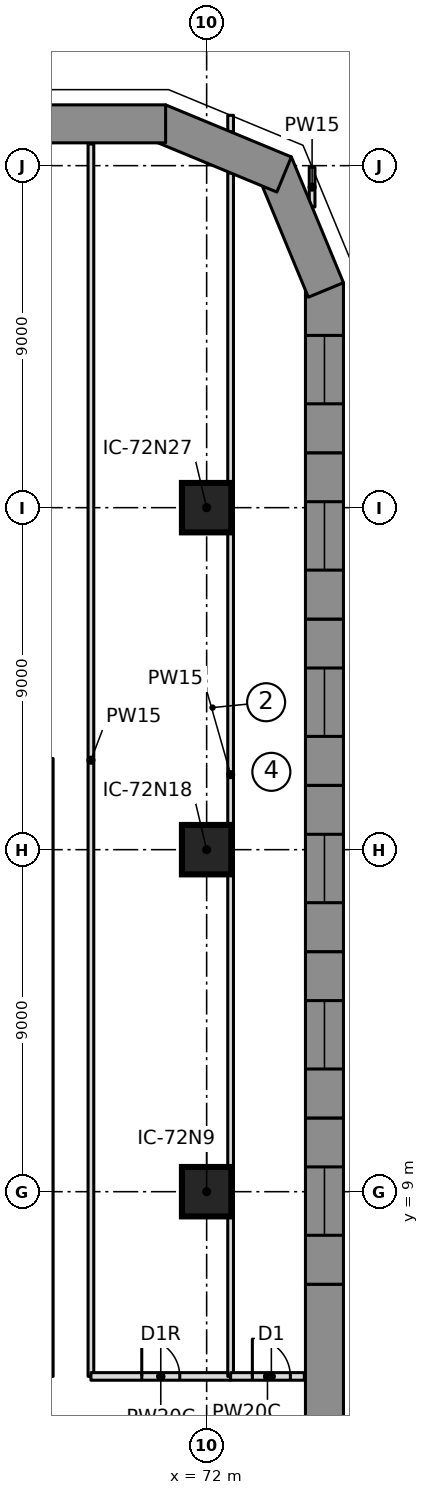
"""IFC4 building model, lengths in metres.
Left out: names, types, materials, properties, quantities, classifications, styles, units other than length and angle.
Written with IfcOpenShell. Run it as: python <this file> out.ifc"""

import sys

from ifc_helpers import new_model, si_unit, direction, frame, frame_2d, origin, origin_2d, place, context, subcontext, project, spatial, polyline, rectangle, outline, extrude, element, fill, save


model = new_model("IFC4")
c1 = context("Model", 3, precision=1e-05, world=origin(), true_north=direction((0.0, 1.0)))
c2 = subcontext(c1, "Body", "Model", "MODEL_VIEW")
j1 = project(units=[si_unit("LENGTHUNIT", "METRE"), si_unit("PLANEANGLEUNIT", "RADIAN")], contexts=[c1])
p1 = place(None, origin())
s1 = spatial("IfcSite", under=j1, at=p1, CompositionType="ELEMENT")
p2 = place(p1, origin())
s2 = spatial("IfcBuilding", under=s1, at=p2, CompositionType="ELEMENT")
p3 = place(p2, frame((0.0, 0.0, 19.0)))
s3 = spatial("IfcBuildingStorey", under=s2, at=p3, CompositionType="ELEMENT", Elevation=19.0)
for number, where, z_axis, x_axis in (
    (1, (72.0, 9.0, 0.0), (0.0, 0.0, 1.0), (1.0, 0.0, 0.0)),
    (2, (72.0, 18.0, 0.0), (0.0, 0.0, 1.0), (1.0, 0.0, 0.0)),
    (3, (72.0, 27.0, 0.0), (0.0, 0.0, 1.0), (1.0, 0.0, 0.0)),
):
    element("IfcColumn", number, at=place(p3, frame(where, z_axis=z_axis, x_axis=x_axis)), inside=s3, PredefinedType="COLUMN", context=c2, shape_type="SweptSolid", body=[
        extrude(rectangle(XDim=1.3, YDim=1.3, at=origin_2d()), origin(), (0.0, 0.0, 1.0), 5.0),
    ])
p4 = place(p3, frame((75.1, 2.188, 0.0), z_axis=(0.0, 0.0, 1.0), x_axis=(0.0, 1.0, 0.0)))
e4 = element("IfcWall", 4, at=p4, inside=s3, PredefinedType="NOTDEFINED", context=c2, shape_type="SweptSolid", body=[
    extrude(outline(polyline([(0.0, -0.5), (4.376, -0.5), (4.376, 0.5), (0.0, 0.5), (0.0, -0.5)])), origin(), (0.0, 0.0, 1.0), 4.7),
])
p5 = place(p3, frame((75.1, 6.564, 0.0), z_axis=(0.0, 0.0, 1.0), x_axis=(0.0, 1.0, 0.0)))
e5 = element("IfcWall", 5, at=p5, inside=s3, PredefinedType="NOTDEFINED", context=c2, shape_type="SweptSolid", body=[
    extrude(outline(polyline([(0.0, -0.5), (4.376, -0.5), (4.376, 0.5), (0.0, 0.5), (0.0, -0.5)])), origin(), (0.0, 0.0, 1.0), 4.7),
])
p6 = place(p5, frame((1.288, 0.0, 0.9)))
e6 = element("IfcOpeningElement", 6, at=p6, cuts=e5, PredefinedType="OPENING", context=c2, shape_type="SweptSolid", body=[
    extrude(rectangle(XDim=1.8, YDim=2.4, at=frame_2d((0.9, 1.2))), frame((0.0, 0.51, 0.0), z_axis=(0.0, -1.0, 0.0), x_axis=(1.0, 0.0, 0.0)), (0.0, 0.0, 1.0), 1.02),
])
p7 = place(p3, frame((75.1, 10.94, 0.0), z_axis=(0.0, 0.0, 1.0), x_axis=(0.0, 1.0, 0.0)))
e7 = element("IfcWall", 7, at=p7, inside=s3, PredefinedType="NOTDEFINED", context=c2, shape_type="SweptSolid", body=[
    extrude(outline(polyline([(0.0, -0.5), (4.376, -0.5), (4.376, 0.5), (0.0, 0.5), (0.0, -0.5)])), origin(), (0.0, 0.0, 1.0), 4.7),
])
p8 = place(p7, frame((1.288, 0.0, 0.9)))
e8 = element("IfcOpeningElement", 8, at=p8, cuts=e7, PredefinedType="OPENING", context=c2, shape_type="SweptSolid", body=[
    extrude(rectangle(XDim=1.8, YDim=2.4, at=frame_2d((0.9, 1.2))), frame((0.0, 0.51, 0.0), z_axis=(0.0, -1.0, 0.0), x_axis=(1.0, 0.0, 0.0)), (0.0, 0.0, 1.0), 1.02),
])
p9 = place(p3, frame((75.1, 15.316, 0.0), z_axis=(0.0, 0.0, 1.0), x_axis=(0.0, 1.0, 0.0)))
e9 = element("IfcWall", 9, at=p9, inside=s3, PredefinedType="NOTDEFINED", context=c2, shape_type="SweptSolid", body=[
    extrude(outline(polyline([(0.0, -0.5), (4.376, -0.5), (4.376, 0.5), (0.0, 0.5), (0.0, -0.5)])), origin(), (0.0, 0.0, 1.0), 4.7),
])
p10 = place(p9, frame((1.288, 0.0, 0.9)))
e10 = element("IfcOpeningElement", 10, at=p10, cuts=e9, PredefinedType="OPENING", context=c2, shape_type="SweptSolid", body=[
    extrude(rectangle(XDim=1.8, YDim=2.4, at=frame_2d((0.9, 1.2))), frame((0.0, 0.51, 0.0), z_axis=(0.0, -1.0, 0.0), x_axis=(1.0, 0.0, 0.0)), (0.0, 0.0, 1.0), 1.02),
])
p11 = place(p3, frame((75.1, 19.693, 0.0), z_axis=(0.0, 0.0, 1.0), x_axis=(0.0, 1.0, 0.0)))
e11 = element("IfcWall", 11, at=p11, inside=s3, PredefinedType="NOTDEFINED", context=c2, shape_type="SweptSolid", body=[
    extrude(outline(polyline([(0.0, -0.5), (4.376, -0.5), (4.376, 0.5), (0.0, 0.5), (0.0, -0.5)])), origin(), (0.0, 0.0, 1.0), 4.7),
])
p12 = place(p11, frame((1.288, 0.0, 0.9)))
e12 = element("IfcOpeningElement", 12, at=p12, cuts=e11, PredefinedType="OPENING", context=c2, shape_type="SweptSolid", body=[
    extrude(rectangle(XDim=1.8, YDim=2.4, at=frame_2d((0.9, 1.2))), frame((0.0, 0.51, 0.0), z_axis=(0.0, -1.0, 0.0), x_axis=(1.0, 0.0, 0.0)), (0.0, 0.0, 1.0), 1.02),
])
p13 = place(p3, frame((75.1, 24.069, 0.0), z_axis=(0.0, 0.0, 1.0), x_axis=(0.0, 1.0, 0.0)))
e13 = element("IfcWall", 13, at=p13, inside=s3, PredefinedType="NOTDEFINED", context=c2, shape_type="SweptSolid", body=[
    extrude(outline(polyline([(0.0, -0.5), (4.376, -0.5), (4.376, 0.5), (0.0, 0.5), (0.0, -0.5)])), origin(), (0.0, 0.0, 1.0), 4.7),
])
p14 = place(p13, frame((1.288, 0.0, 0.9)))
e14 = element("IfcOpeningElement", 14, at=p14, cuts=e13, PredefinedType="OPENING", context=c2, shape_type="SweptSolid", body=[
    extrude(rectangle(XDim=1.8, YDim=2.4, at=frame_2d((0.9, 1.2))), frame((0.0, 0.51, 0.0), z_axis=(0.0, -1.0, 0.0), x_axis=(1.0, 0.0, 0.0)), (0.0, 0.0, 1.0), 1.02),
])
p15 = place(p3, frame((75.1, 28.445, 0.0), z_axis=(0.0, 0.0, 1.0), x_axis=(0.0, 1.0, 0.0)))
e15 = element("IfcWall", 15, at=p15, inside=s3, PredefinedType="NOTDEFINED", context=c2, shape_type="SweptSolid", body=[
    extrude(outline(polyline([(0.0, -0.5), (4.476, -0.5), (4.277, 0.5), (0.0, 0.5), (0.0, -0.5)])), origin(), (0.0, 0.0, 1.0), 4.7),
])
p16 = place(p15, frame((1.288, 0.0, 0.9)))
e16 = element("IfcOpeningElement", 16, at=p16, cuts=e15, PredefinedType="OPENING", context=c2, shape_type="SweptSolid", body=[
    extrude(rectangle(XDim=1.8, YDim=2.4, at=frame_2d((0.9, 1.2))), frame((0.0, 0.51, 0.0), z_axis=(0.0, -1.0, 0.0), x_axis=(1.0, 0.0, 0.0)), (0.0, 0.0, 1.0), 1.02),
])
p17 = place(p3, frame((75.1, 32.821, 0.0), z_axis=(0.0, 0.0, 1.0), x_axis=(-0.382724875529, 0.923862365102, 0.0)))
e17 = element("IfcWall", 17, at=p17, inside=s3, PredefinedType="NOTDEFINED", context=c2, shape_type="SweptSolid", body=[
    extrude(outline(polyline([(-0.1, -0.5), (3.482, -0.5), (3.068, 0.5), (0.1, 0.5), (-0.1, -0.5)])), origin(), (0.0, 0.0, 1.0), 4.7),
])
p18 = place(p3, frame((73.847, 35.847, 0.0), z_axis=(0.0, 0.0, 1.0), x_axis=(-0.923862365102, 0.382724875529, 0.0)))
e18 = element("IfcWall", 18, at=p18, inside=s3, PredefinedType="NOTDEFINED", context=c2, shape_type="SweptSolid", body=[
    extrude(outline(polyline([(-0.207, -0.5), (3.375, -0.5), (3.175, 0.5), (0.207, 0.5), (-0.207, -0.5)])), origin(), (0.0, 0.0, 1.0), 4.7),
])
p19 = place(p3, frame((70.821, 37.1, 0.0), z_axis=(0.0, 0.0, 1.0), x_axis=(-1.0, 0.0, 0.0)))
e19 = element("IfcWall", 19, at=p19, inside=s3, PredefinedType="NOTDEFINED", context=c2, shape_type="SweptSolid", body=[
    extrude(outline(polyline([(-0.1, -0.5), (3.94, -0.5), (3.94, 0.5), (0.1, 0.5), (-0.1, -0.5)])), origin(), (0.0, 0.0, 1.0), 4.7),
])
p20 = place(p3, frame((68.955, 4.139, 0.0), z_axis=(0.0, 0.0, 1.0), x_axis=(0.0, 1.0, 0.0)))
e20 = element("IfcWall", 20, at=p20, inside=s3, PredefinedType="PARTITIONING", context=c2, shape_type="SweptSolid", body=[
    extrude(rectangle(XDim=32.431, YDim=0.15, at=frame_2d((16.216, 0.0))), origin(), (0.0, 0.0, 1.0), 4.65),
])
p21 = place(p3, frame((68.955, 4.139, 0.0), z_axis=(0.0, 0.0, 1.0), x_axis=(1.0, 0.0, 0.0)))
e21 = element("IfcWall", 21, at=p21, inside=s3, PredefinedType="PARTITIONING", context=c2, shape_type="SweptSolid", body=[
    extrude(rectangle(XDim=3.676, YDim=0.2, at=frame_2d((1.838, 0.0))), origin(), (0.0, 0.0, 1.0), 4.65),
])
p22 = place(p21, frame((1.338, 0.0, 0.0)))
e22 = element("IfcOpeningElement", 22, at=p22, cuts=e21, PredefinedType="OPENING", context=c2, shape_type="SweptSolid", body=[
    extrude(rectangle(XDim=1.0, YDim=2.1, at=frame_2d((0.5, 1.05))), frame((0.0, 0.11, 0.0), z_axis=(0.0, -1.0, 0.0), x_axis=(1.0, 0.0, 0.0)), (0.0, 0.0, 1.0), 0.22),
])
p23 = place(p3, frame((72.631, 4.139, 0.0), z_axis=(0.0, 0.0, 1.0), x_axis=(0.0, 1.0, 0.0)))
e23 = element("IfcWall", 23, at=p23, inside=s3, PredefinedType="PARTITIONING", context=c2, shape_type="SweptSolid", body=[
    extrude(rectangle(XDim=31.67, YDim=0.15, at=frame_2d((15.835, 0.0))), origin(), (0.0, 0.0, 1.0), 4.65),
])
p24 = place(p3, frame((72.631, 36.892, 0.0), z_axis=(0.0, 0.0, 1.0), x_axis=(0.0, 1.0, 0.0)))
e24 = element("IfcWall", 24, at=p24, inside=s3, PredefinedType="PARTITIONING", context=c2, shape_type="SweptSolid", body=[
    extrude(rectangle(XDim=0.433, YDim=0.15, at=frame_2d((0.217, 0.0))), origin(), (0.0, 0.0, 1.0), 4.65),
])
p25 = place(p3, frame((72.631, 4.139, 0.0), z_axis=(0.0, 0.0, 1.0), x_axis=(1.0, 0.0, 0.0)))
e25 = element("IfcWall", 25, at=p25, inside=s3, PredefinedType="PARTITIONING", context=c2, shape_type="SweptSolid", body=[
    extrude(rectangle(XDim=1.939, YDim=0.2, at=frame_2d((0.97, 0.0))), origin(), (0.0, 0.0, 1.0), 4.65),
])
p26 = place(p25, frame((0.572, 0.0, 0.0)))
e26 = element("IfcOpeningElement", 26, at=p26, cuts=e25, PredefinedType="OPENING", context=c2, shape_type="SweptSolid", body=[
    extrude(rectangle(XDim=1.0, YDim=2.1, at=frame_2d((0.5, 1.05))), frame((0.0, 0.11, 0.0), z_axis=(0.0, -1.0, 0.0), x_axis=(1.0, 0.0, 0.0)), (0.0, 0.0, 1.0), 0.22),
])
p27 = place(p3, frame((74.775, 34.913, 0.0), z_axis=(0.0, 0.0, 1.0), x_axis=(0.0, 1.0, 0.0)))
e27 = element("IfcWall", 27, at=p27, inside=s3, PredefinedType="PARTITIONING", context=c2, shape_type="SweptSolid", body=[
    extrude(rectangle(XDim=1.045, YDim=0.15, at=frame_2d((0.523, 0.0))), origin(), (0.0, 0.0, 1.0), 4.65),
])
p28 = place(p3, frame((67.86, 4.139, 0.0), z_axis=(0.0, 0.0, 1.0), x_axis=(0.0, 1.0, 0.0)))
e28 = element("IfcWall", 28, at=p28, inside=s3, PredefinedType="PARTITIONING", context=c2, shape_type="SweptSolid", body=[
    extrude(rectangle(XDim=16.261, YDim=0.2, at=frame_2d((8.131, 0.0))), origin(), (0.0, 0.0, 1.0), 4.65),
])
p29 = place(p28, frame((7.631, 0.0, 0.0)))
e29 = element("IfcOpeningElement", 29, at=p29, cuts=e28, PredefinedType="OPENING", context=c2, shape_type="SweptSolid", body=[
    extrude(rectangle(XDim=1.0, YDim=2.1, at=frame_2d((0.5, 1.05))), frame((0.0, 0.11, 0.0), z_axis=(0.0, -1.0, 0.0), x_axis=(1.0, 0.0, 0.0)), (0.0, 0.0, 1.0), 0.22),
])
p30 = place(p6, origin())
e30 = element("IfcWindow", 30, at=p30, inside=s3, PartitioningType="SINGLE_PANEL", PredefinedType="WINDOW", context=c2, shape_type="SweptSolid", body=[
    extrude(rectangle(XDim=1.8, YDim=2.4, at=frame_2d((0.9, 1.2))), frame((0.0, 0.5, 0.0), z_axis=(0.0, -1.0, 0.0), x_axis=(1.0, 0.0, 0.0)), (0.0, 0.0, 1.0), 0.06),
])
fill(e6, e30)
p31 = place(p8, origin())
e31 = element("IfcWindow", 31, at=p31, inside=s3, PartitioningType="SINGLE_PANEL", PredefinedType="WINDOW", context=c2, shape_type="SweptSolid", body=[
    extrude(rectangle(XDim=1.8, YDim=2.4, at=frame_2d((0.9, 1.2))), frame((0.0, 0.5, 0.0), z_axis=(0.0, -1.0, 0.0), x_axis=(1.0, 0.0, 0.0)), (0.0, 0.0, 1.0), 0.06),
])
fill(e8, e31)
p32 = place(p10, origin())
e32 = element("IfcWindow", 32, at=p32, inside=s3, PartitioningType="SINGLE_PANEL", PredefinedType="WINDOW", context=c2, shape_type="SweptSolid", body=[
    extrude(rectangle(XDim=1.8, YDim=2.4, at=frame_2d((0.9, 1.2))), frame((0.0, 0.5, 0.0), z_axis=(0.0, -1.0, 0.0), x_axis=(1.0, 0.0, 0.0)), (0.0, 0.0, 1.0), 0.06),
])
fill(e10, e32)
p33 = place(p12, origin())
e33 = element("IfcWindow", 33, at=p33, inside=s3, PartitioningType="SINGLE_PANEL", PredefinedType="WINDOW", context=c2, shape_type="SweptSolid", body=[
    extrude(rectangle(XDim=1.8, YDim=2.4, at=frame_2d((0.9, 1.2))), frame((0.0, 0.5, 0.0), z_axis=(0.0, -1.0, 0.0), x_axis=(1.0, 0.0, 0.0)), (0.0, 0.0, 1.0), 0.06),
])
fill(e12, e33)
p34 = place(p14, origin())
e34 = element("IfcWindow", 34, at=p34, inside=s3, PartitioningType="SINGLE_PANEL", PredefinedType="WINDOW", context=c2, shape_type="SweptSolid", body=[
    extrude(rectangle(XDim=1.8, YDim=2.4, at=frame_2d((0.9, 1.2))), frame((0.0, 0.5, 0.0), z_axis=(0.0, -1.0, 0.0), x_axis=(1.0, 0.0, 0.0)), (0.0, 0.0, 1.0), 0.06),
])
fill(e14, e34)
p35 = place(p16, origin())
e35 = element("IfcWindow", 35, at=p35, inside=s3, PartitioningType="SINGLE_PANEL", PredefinedType="WINDOW", context=c2, shape_type="SweptSolid", body=[
    extrude(rectangle(XDim=1.8, YDim=2.4, at=frame_2d((0.9, 1.2))), frame((0.0, 0.5, 0.0), z_axis=(0.0, -1.0, 0.0), x_axis=(1.0, 0.0, 0.0)), (0.0, 0.0, 1.0), 0.06),
])
fill(e16, e35)
p36 = place(p22, origin())
e36 = element("IfcDoor", 36, at=p36, inside=s3, OperationType="SINGLE_SWING_RIGHT", PredefinedType="DOOR", context=c2, shape_type="SweptSolid", body=[
    extrude(rectangle(XDim=1.0, YDim=2.1, at=frame_2d((0.5, 1.05))), frame((0.0, 0.025, 0.0), z_axis=(0.0, -1.0, 0.0), x_axis=(1.0, 0.0, 0.0)), (0.0, 0.0, 1.0), 0.05),
])
fill(e22, e36)
p37 = place(p26, origin())
e37 = element("IfcDoor", 37, at=p37, inside=s3, OperationType="SINGLE_SWING_LEFT", PredefinedType="DOOR", context=c2, shape_type="SweptSolid", body=[
    extrude(rectangle(XDim=1.0, YDim=2.1, at=frame_2d((0.5, 1.05))), frame((0.0, 0.025, 0.0), z_axis=(0.0, -1.0, 0.0), x_axis=(1.0, 0.0, 0.0)), (0.0, 0.0, 1.0), 0.05),
])
fill(e26, e37)
save(model, sys.argv[1])
